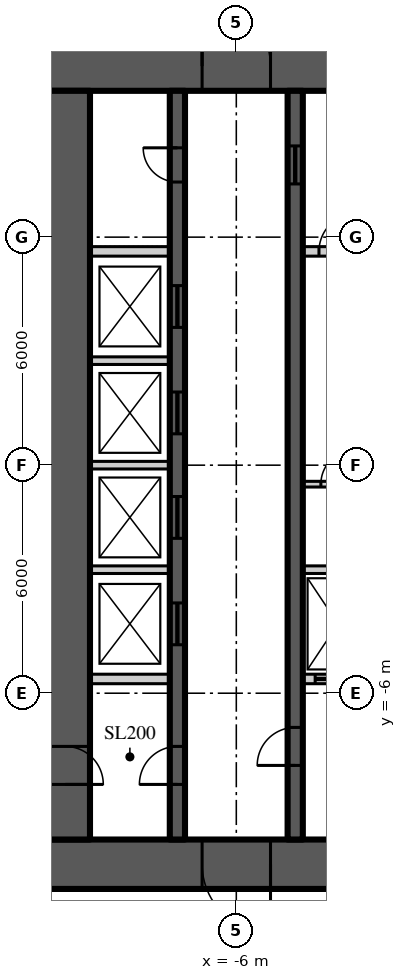
"""IFC4 building model, lengths in metres.
Left out: names, types, materials, properties, quantities, classifications, styles, units other than length and angle.
Written with IfcOpenShell. Run it as: python <this file> out.ifc"""

import sys

from ifc_helpers import new_model, si_unit, direction, frame, frame_2d, origin, place, context, subcontext, project, spatial, rectangle, extrude, element, fill, save


model = new_model("IFC4")
c1 = context("Model", 3, precision=1e-05, world=origin(), true_north=direction((0.0, 1.0)))
c2 = subcontext(c1, "Body", "Model", "MODEL_VIEW")
j1 = project(units=[si_unit("LENGTHUNIT", "METRE"), si_unit("PLANEANGLEUNIT", "RADIAN")], contexts=[c1])
p1 = place(None, origin())
s1 = spatial("IfcSite", under=j1, at=p1, CompositionType="ELEMENT")
p2 = place(p1, origin())
s2 = spatial("IfcBuilding", under=s1, at=p2, CompositionType="ELEMENT")
p3 = place(p2, origin())
s3 = spatial("IfcBuildingStorey", under=s2, at=p3, CompositionType="ELEMENT", Elevation=0.0)
p4 = place(p3, frame((-11.15, 10.5, 0.0), z_axis=(0.0, 0.0, 1.0), x_axis=(1.0, 0.0, 0.0)))
e1 = element("IfcWall", 1, at=p4, inside=s3, PredefinedType="SHEAR", context=c2, shape_type="SweptSolid", body=[
    extrude(rectangle(XDim=22.3, YDim=1.3, at=frame_2d((11.15, 0.0))), origin(), (0.0, 0.0, 1.0), 7.0),
])
p5 = place(p4, frame((4.25, 0.0, 0.0)))
e2 = element("IfcOpeningElement", 2, at=p5, cuts=e1, PredefinedType="OPENING", context=c2, shape_type="SweptSolid", body=[
    extrude(rectangle(XDim=1.8, YDim=2.2, at=frame_2d((0.9, 1.1))), frame((0.0, 0.66, 0.0), z_axis=(0.0, -1.0, 0.0), x_axis=(1.0, 0.0, 0.0)), (0.0, 0.0, 1.0), 1.32),
])
p6 = place(p4, frame((16.25, 0.0, 0.0)))
e3 = element("IfcOpeningElement", 3, at=p6, cuts=e1, PredefinedType="OPENING", context=c2, shape_type="SweptSolid", body=[
    extrude(rectangle(XDim=1.8, YDim=2.2, at=frame_2d((0.9, 1.1))), frame((0.0, 0.66, 0.0), z_axis=(0.0, -1.0, 0.0), x_axis=(1.0, 0.0, 0.0)), (0.0, 0.0, 1.0), 1.32),
])
p7 = place(p3, frame((11.15, -10.5, 0.0), z_axis=(0.0, 0.0, 1.0), x_axis=(-1.0, 0.0, 0.0)))
e4 = element("IfcWall", 4, at=p7, inside=s3, PredefinedType="SHEAR", context=c2, shape_type="SweptSolid", body=[
    extrude(rectangle(XDim=22.3, YDim=1.3, at=frame_2d((11.15, 0.0))), origin(), (0.0, 0.0, 1.0), 7.0),
])
p8 = place(p7, frame((16.25, 0.0, 0.0)))
e5 = element("IfcOpeningElement", 5, at=p8, cuts=e4, PredefinedType="OPENING", context=c2, shape_type="SweptSolid", body=[
    extrude(rectangle(XDim=1.8, YDim=2.2, at=frame_2d((0.9, 1.1))), frame((0.0, 0.66, 0.0), z_axis=(0.0, -1.0, 0.0), x_axis=(1.0, 0.0, 0.0)), (0.0, 0.0, 1.0), 1.32),
])
p9 = place(p7, frame((4.25, 0.0, 0.0)))
e6 = element("IfcOpeningElement", 6, at=p9, cuts=e4, PredefinedType="OPENING", context=c2, shape_type="SweptSolid", body=[
    extrude(rectangle(XDim=1.8, YDim=2.2, at=frame_2d((0.9, 1.1))), frame((0.0, 0.66, 0.0), z_axis=(0.0, -1.0, 0.0), x_axis=(1.0, 0.0, 0.0)), (0.0, 0.0, 1.0), 1.32),
])
p10 = place(p3, frame((-10.5, 9.85, 0.0), z_axis=(0.0, 0.0, 1.0), x_axis=(0.0, -1.0, 0.0)))
e7 = element("IfcWall", 7, at=p10, inside=s3, PredefinedType="SHEAR", context=c2, shape_type="SweptSolid", body=[
    extrude(rectangle(XDim=19.7, YDim=1.3, at=frame_2d((9.85, 0.0))), origin(), (0.0, 0.0, 1.0), 7.0),
])
p11 = place(p10, frame((17.25, 0.0, 0.0)))
e8 = element("IfcOpeningElement", 8, at=p11, cuts=e7, PredefinedType="OPENING", context=c2, shape_type="SweptSolid", body=[
    extrude(rectangle(XDim=1.0, YDim=2.2, at=frame_2d((0.5, 1.1))), frame((0.0, 0.66, 0.0), z_axis=(0.0, -1.0, 0.0), x_axis=(1.0, 0.0, 0.0)), (0.0, 0.0, 1.0), 1.32),
])
p12 = place(p3, frame((-7.55, -9.85, 0.0), z_axis=(0.0, 0.0, 1.0), x_axis=(0.0, 1.0, 0.0)))
e9 = element("IfcWall", 9, at=p12, inside=s3, PredefinedType="SHEAR", context=c2, shape_type="SweptSolid", body=[
    extrude(rectangle(XDim=19.7, YDim=0.4, at=frame_2d((9.85, 0.0))), origin(), (0.0, 0.0, 1.0), 7.0),
])
p13 = place(p12, frame((1.45, 0.0, 0.0)))
e10 = element("IfcOpeningElement", 10, at=p13, cuts=e9, PredefinedType="OPENING", context=c2, shape_type="SweptSolid", body=[
    extrude(rectangle(XDim=1.0, YDim=2.2, at=frame_2d((0.5, 1.1))), frame((0.0, 0.21, 0.0), z_axis=(0.0, -1.0, 0.0), x_axis=(1.0, 0.0, 0.0)), (0.0, 0.0, 1.0), 0.42),
])
p14 = place(p12, frame((17.3, 0.0, 0.0)))
e11 = element("IfcOpeningElement", 11, at=p14, cuts=e9, PredefinedType="OPENING", context=c2, shape_type="SweptSolid", body=[
    extrude(rectangle(XDim=0.9, YDim=2.1, at=frame_2d((0.45, 1.05))), frame((0.0, 0.21, 0.0), z_axis=(0.0, -1.0, 0.0), x_axis=(1.0, 0.0, 0.0)), (0.0, 0.0, 1.0), 0.42),
])
p15 = place(p12, frame((5.125, 0.0, 0.0)))
e12 = element("IfcOpeningElement", 12, at=p15, cuts=e9, PredefinedType="OPENING", context=c2, shape_type="SweptSolid", body=[
    extrude(rectangle(XDim=1.1, YDim=2.2, at=frame_2d((0.55, 1.1))), frame((0.0, 0.21, 0.0), z_axis=(0.0, -1.0, 0.0), x_axis=(1.0, 0.0, 0.0)), (0.0, 0.0, 1.0), 0.42),
])
p16 = place(p12, frame((7.925, 0.0, 0.0)))
e13 = element("IfcOpeningElement", 13, at=p16, cuts=e9, PredefinedType="OPENING", context=c2, shape_type="SweptSolid", body=[
    extrude(rectangle(XDim=1.1, YDim=2.2, at=frame_2d((0.55, 1.1))), frame((0.0, 0.21, 0.0), z_axis=(0.0, -1.0, 0.0), x_axis=(1.0, 0.0, 0.0)), (0.0, 0.0, 1.0), 0.42),
])
p17 = place(p12, frame((10.675, 0.0, 0.0)))
e14 = element("IfcOpeningElement", 14, at=p17, cuts=e9, PredefinedType="OPENING", context=c2, shape_type="SweptSolid", body=[
    extrude(rectangle(XDim=1.1, YDim=2.2, at=frame_2d((0.55, 1.1))), frame((0.0, 0.21, 0.0), z_axis=(0.0, -1.0, 0.0), x_axis=(1.0, 0.0, 0.0)), (0.0, 0.0, 1.0), 0.42),
])
p18 = place(p12, frame((13.475, 0.0, 0.0)))
e15 = element("IfcOpeningElement", 15, at=p18, cuts=e9, PredefinedType="OPENING", context=c2, shape_type="SweptSolid", body=[
    extrude(rectangle(XDim=1.1, YDim=2.2, at=frame_2d((0.55, 1.1))), frame((0.0, 0.21, 0.0), z_axis=(0.0, -1.0, 0.0), x_axis=(1.0, 0.0, 0.0)), (0.0, 0.0, 1.0), 0.42),
])
p19 = place(p3, frame((-4.45, -9.85, 0.0), z_axis=(0.0, 0.0, 1.0), x_axis=(0.0, 1.0, 0.0)))
e16 = element("IfcWall", 16, at=p19, inside=s3, PredefinedType="SHEAR", context=c2, shape_type="SweptSolid", body=[
    extrude(rectangle(XDim=19.7, YDim=0.4, at=frame_2d((9.85, 0.0))), origin(), (0.0, 0.0, 1.0), 7.0),
])
p20 = place(p19, frame((1.95, 0.0, 0.0)))
e17 = element("IfcOpeningElement", 17, at=p20, cuts=e16, PredefinedType="OPENING", context=c2, shape_type="SweptSolid", body=[
    extrude(rectangle(XDim=1.0, YDim=2.2, at=frame_2d((0.5, 1.1))), frame((0.0, 0.21, 0.0), z_axis=(0.0, -1.0, 0.0), x_axis=(1.0, 0.0, 0.0)), (0.0, 0.0, 1.0), 0.42),
])
p21 = place(p19, frame((17.25, 0.0, 0.0)))
e18 = element("IfcOpeningElement", 18, at=p21, cuts=e16, PredefinedType="OPENING", context=c2, shape_type="SweptSolid", body=[
    extrude(rectangle(XDim=1.0, YDim=2.1, at=frame_2d((0.5, 1.05))), frame((0.0, 0.21, 0.0), z_axis=(0.0, -1.0, 0.0), x_axis=(1.0, 0.0, 0.0)), (0.0, 0.0, 1.0), 0.42),
])
p22 = place(p3, frame((-9.85, 5.625, 0.0), z_axis=(0.0, 0.0, 1.0), x_axis=(1.0, 0.0, 0.0)))
e19 = element("IfcWall", 19, at=p22, inside=s3, PredefinedType="SOLIDWALL", context=c2, shape_type="SweptSolid", body=[
    extrude(rectangle(XDim=2.1, YDim=0.25, at=frame_2d((1.05, 0.0))), origin(), (0.0, 0.0, 1.0), 6.8),
])
p23 = place(p3, frame((-4.25, 5.625, 0.0), z_axis=(0.0, 0.0, 1.0), x_axis=(1.0, 0.0, 0.0)))
e20 = element("IfcWall", 20, at=p23, inside=s3, PredefinedType="SOLIDWALL", context=c2, shape_type="SweptSolid", body=[
    extrude(rectangle(XDim=1.85, YDim=0.25, at=frame_2d((0.925, 0.0))), origin(), (0.0, 0.0, 1.0), 6.8),
])
p24 = place(p23, frame((0.425, 0.0, 0.0)))
e21 = element("IfcOpeningElement", 21, at=p24, cuts=e20, PredefinedType="OPENING", context=c2, shape_type="SweptSolid", body=[
    extrude(rectangle(XDim=1.0, YDim=2.2, at=frame_2d((0.5, 1.1))), frame((0.0, 0.135, 0.0), z_axis=(0.0, -1.0, 0.0), x_axis=(1.0, 0.0, 0.0)), (0.0, 0.0, 1.0), 0.27),
])
p25 = place(p3, frame((-9.85, -5.625, 0.0), z_axis=(0.0, 0.0, 1.0), x_axis=(1.0, 0.0, 0.0)))
e22 = element("IfcWall", 22, at=p25, inside=s3, PredefinedType="SOLIDWALL", context=c2, shape_type="SweptSolid", body=[
    extrude(rectangle(XDim=2.1, YDim=0.25, at=frame_2d((1.05, 0.0))), origin(), (0.0, 0.0, 1.0), 6.8),
])
p26 = place(p3, frame((-4.25, -5.625, 0.0), z_axis=(0.0, 0.0, 1.0), x_axis=(1.0, 0.0, 0.0)))
e23 = element("IfcWall", 23, at=p26, inside=s3, PredefinedType="SOLIDWALL", context=c2, shape_type="SweptSolid", body=[
    extrude(rectangle(XDim=1.85, YDim=0.25, at=frame_2d((0.925, 0.0))), origin(), (0.0, 0.0, 1.0), 6.8),
])
p27 = place(p26, frame((0.325, 0.0, 0.0)))
e24 = element("IfcOpeningElement", 24, at=p27, cuts=e23, PredefinedType="OPENING", context=c2, shape_type="SweptSolid", body=[
    extrude(rectangle(XDim=1.2, YDim=2.2, at=frame_2d((0.6, 1.1))), frame((0.0, 0.135, 0.0), z_axis=(0.0, -1.0, 0.0), x_axis=(1.0, 0.0, 0.0)), (0.0, 0.0, 1.0), 0.27),
])
p28 = place(p3, frame((-9.85, -2.75, 0.0), z_axis=(0.0, 0.0, 1.0), x_axis=(1.0, 0.0, 0.0)))
e25 = element("IfcWall", 25, at=p28, inside=s3, PredefinedType="SOLIDWALL", context=c2, shape_type="SweptSolid", body=[
    extrude(rectangle(XDim=2.1, YDim=0.2, at=frame_2d((1.05, 0.0))), origin(), (0.0, 0.0, 1.0), 6.8),
])
p29 = place(p3, frame((-4.25, -2.75, 0.0), z_axis=(0.0, 0.0, 1.0), x_axis=(1.0, 0.0, 0.0)))
e26 = element("IfcWall", 26, at=p29, inside=s3, PredefinedType="SOLIDWALL", context=c2, shape_type="SweptSolid", body=[
    extrude(rectangle(XDim=1.85, YDim=0.2, at=frame_2d((0.925, 0.0))), origin(), (0.0, 0.0, 1.0), 6.8),
])
for number, where, z_axis, x_axis in (
    (27, (-9.85, 0.0, 0.0), (0.0, 0.0, 1.0), (1.0, 0.0, 0.0)),
    (28, (-9.85, 2.75, 0.0), (0.0, 0.0, 1.0), (1.0, 0.0, 0.0)),
):
    element("IfcWall", number, at=place(p3, frame(where, z_axis=z_axis, x_axis=x_axis)), inside=s3, PredefinedType="SOLIDWALL", context=c2, shape_type="SweptSolid", body=[
        extrude(rectangle(XDim=2.1, YDim=0.2, at=frame_2d((1.05, 0.0))), origin(), (0.0, 0.0, 1.0), 6.8),
    ])
p30 = place(p3, frame((-4.25, -0.5, 0.0), z_axis=(0.0, 0.0, 1.0), x_axis=(1.0, 0.0, 0.0)))
e29 = element("IfcWall", 29, at=p30, inside=s3, PredefinedType="SOLIDWALL", context=c2, shape_type="SweptSolid", body=[
    extrude(rectangle(XDim=1.85, YDim=0.15, at=frame_2d((0.925, 0.0))), origin(), (0.0, 0.0, 1.0), 6.75),
])
p31 = place(p30, frame((0.475, 0.0, 0.0)))
e30 = element("IfcOpeningElement", 30, at=p31, cuts=e29, PredefinedType="OPENING", context=c2, shape_type="SweptSolid", body=[
    extrude(rectangle(XDim=0.9, YDim=2.1, at=frame_2d((0.45, 1.05))), frame((0.0, 0.085, 0.0), z_axis=(0.0, -1.0, 0.0), x_axis=(1.0, 0.0, 0.0)), (0.0, 0.0, 1.0), 0.17),
])
p32 = place(p5, origin())
e31 = element("IfcDoor", 31, at=p32, inside=s3, OperationType="DOUBLE_DOOR_DOUBLE_SWING", PredefinedType="DOOR", context=c2, shape_type="SweptSolid", body=[
    extrude(rectangle(XDim=1.8, YDim=2.2, at=frame_2d((0.9, 1.1))), frame((0.0, 0.025, 0.0), z_axis=(0.0, -1.0, 0.0), x_axis=(1.0, 0.0, 0.0)), (0.0, 0.0, 1.0), 0.05),
])
fill(e2, e31)
p33 = place(p8, origin())
e32 = element("IfcDoor", 32, at=p33, inside=s3, OperationType="DOUBLE_DOOR_DOUBLE_SWING", PredefinedType="DOOR", context=c2, shape_type="SweptSolid", body=[
    extrude(rectangle(XDim=1.8, YDim=2.2, at=frame_2d((0.9, 1.1))), frame((0.0, 0.025, 0.0), z_axis=(0.0, -1.0, 0.0), x_axis=(1.0, 0.0, 0.0)), (0.0, 0.0, 1.0), 0.05),
])
fill(e5, e32)
p34 = place(p13, origin())
e33 = element("IfcDoor", 33, at=p34, inside=s3, OperationType="SINGLE_SWING_LEFT", PredefinedType="DOOR", context=c2, shape_type="SweptSolid", body=[
    extrude(rectangle(XDim=1.0, YDim=2.2, at=frame_2d((0.5, 1.1))), frame((0.0, 0.025, 0.0), z_axis=(0.0, -1.0, 0.0), x_axis=(1.0, 0.0, 0.0)), (0.0, 0.0, 1.0), 0.05),
])
fill(e10, e33)
p35 = place(p11, origin())
e34 = element("IfcDoor", 34, at=p35, inside=s3, OperationType="SINGLE_SWING_RIGHT", PredefinedType="DOOR", context=c2, shape_type="SweptSolid", body=[
    extrude(rectangle(XDim=1.0, YDim=2.2, at=frame_2d((0.5, 1.1))), frame((0.0, 0.025, 0.0), z_axis=(0.0, -1.0, 0.0), x_axis=(1.0, 0.0, 0.0)), (0.0, 0.0, 1.0), 0.05),
])
fill(e8, e34)
p36 = place(p20, origin())
e35 = element("IfcDoor", 35, at=p36, inside=s3, OperationType="SINGLE_SWING_LEFT", PredefinedType="DOOR", context=c2, shape_type="SweptSolid", body=[
    extrude(rectangle(XDim=1.0, YDim=2.2, at=frame_2d((0.5, 1.1))), frame((0.0, 0.025, 0.0), z_axis=(0.0, -1.0, 0.0), x_axis=(1.0, 0.0, 0.0)), (0.0, 0.0, 1.0), 0.05),
])
fill(e17, e35)
p37 = place(p14, origin())
e36 = element("IfcDoor", 36, at=p37, inside=s3, OperationType="SINGLE_SWING_RIGHT", PredefinedType="DOOR", context=c2, shape_type="SweptSolid", body=[
    extrude(rectangle(XDim=0.9, YDim=2.1, at=frame_2d((0.45, 1.05))), frame((0.0, 0.025, 0.0), z_axis=(0.0, -1.0, 0.0), x_axis=(1.0, 0.0, 0.0)), (0.0, 0.0, 1.0), 0.05),
])
fill(e11, e36)
p38 = place(p21, origin())
e37 = element("IfcDoor", 37, at=p38, inside=s3, OperationType="SLIDING_TO_LEFT", PredefinedType="DOOR", context=c2, shape_type="SweptSolid", body=[
    extrude(rectangle(XDim=1.0, YDim=2.1, at=frame_2d((0.5, 1.05))), frame((0.0, 0.025, 0.0), z_axis=(0.0, -1.0, 0.0), x_axis=(1.0, 0.0, 0.0)), (0.0, 0.0, 1.0), 0.05),
])
fill(e18, e37)
p39 = place(p15, origin())
e38 = element("IfcDoor", 38, at=p39, inside=s3, OperationType="SLIDING_TO_LEFT", PredefinedType="DOOR", context=c2, shape_type="SweptSolid", body=[
    extrude(rectangle(XDim=1.1, YDim=2.2, at=frame_2d((0.55, 1.1))), frame((0.0, 0.025, 0.0), z_axis=(0.0, -1.0, 0.0), x_axis=(1.0, 0.0, 0.0)), (0.0, 0.0, 1.0), 0.05),
])
fill(e12, e38)
p40 = place(p16, origin())
e39 = element("IfcDoor", 39, at=p40, inside=s3, OperationType="SLIDING_TO_LEFT", PredefinedType="DOOR", context=c2, shape_type="SweptSolid", body=[
    extrude(rectangle(XDim=1.1, YDim=2.2, at=frame_2d((0.55, 1.1))), frame((0.0, 0.025, 0.0), z_axis=(0.0, -1.0, 0.0), x_axis=(1.0, 0.0, 0.0)), (0.0, 0.0, 1.0), 0.05),
])
fill(e13, e39)
p41 = place(p17, origin())
e40 = element("IfcDoor", 40, at=p41, inside=s3, OperationType="SLIDING_TO_LEFT", PredefinedType="DOOR", context=c2, shape_type="SweptSolid", body=[
    extrude(rectangle(XDim=1.1, YDim=2.2, at=frame_2d((0.55, 1.1))), frame((0.0, 0.025, 0.0), z_axis=(0.0, -1.0, 0.0), x_axis=(1.0, 0.0, 0.0)), (0.0, 0.0, 1.0), 0.05),
])
fill(e14, e40)
p42 = place(p18, origin())
e41 = element("IfcDoor", 41, at=p42, inside=s3, OperationType="SLIDING_TO_LEFT", PredefinedType="DOOR", context=c2, shape_type="SweptSolid", body=[
    extrude(rectangle(XDim=1.1, YDim=2.2, at=frame_2d((0.55, 1.1))), frame((0.0, 0.025, 0.0), z_axis=(0.0, -1.0, 0.0), x_axis=(1.0, 0.0, 0.0)), (0.0, 0.0, 1.0), 0.05),
])
fill(e15, e41)
p43 = place(p27, origin())
e42 = element("IfcDoor", 42, at=p43, inside=s3, OperationType="SLIDING_TO_LEFT", PredefinedType="DOOR", context=c2, shape_type="SweptSolid", body=[
    extrude(rectangle(XDim=1.2, YDim=2.2, at=frame_2d((0.6, 1.1))), frame((0.0, 0.025, 0.0), z_axis=(0.0, -1.0, 0.0), x_axis=(1.0, 0.0, 0.0)), (0.0, 0.0, 1.0), 0.05),
])
fill(e24, e42)
p44 = place(p31, origin())
e43 = element("IfcDoor", 43, at=p44, inside=s3, OperationType="SINGLE_SWING_RIGHT", PredefinedType="DOOR", context=c2, shape_type="SweptSolid", body=[
    extrude(rectangle(XDim=0.9, YDim=2.1, at=frame_2d((0.45, 1.05))), frame((0.0, 0.025, 0.0), z_axis=(0.0, -1.0, 0.0), x_axis=(1.0, 0.0, 0.0)), (0.0, 0.0, 1.0), 0.05),
])
fill(e30, e43)
p45 = place(p24, origin())
e44 = element("IfcDoor", 44, at=p45, inside=s3, OperationType="SINGLE_SWING_RIGHT", PredefinedType="DOOR", context=c2, shape_type="SweptSolid", body=[
    extrude(rectangle(XDim=1.0, YDim=2.2, at=frame_2d((0.5, 1.1))), frame((0.0, 0.025, 0.0), z_axis=(0.0, -1.0, 0.0), x_axis=(1.0, 0.0, 0.0)), (0.0, 0.0, 1.0), 0.05),
])
fill(e21, e44)
save(model, sys.argv[1])
